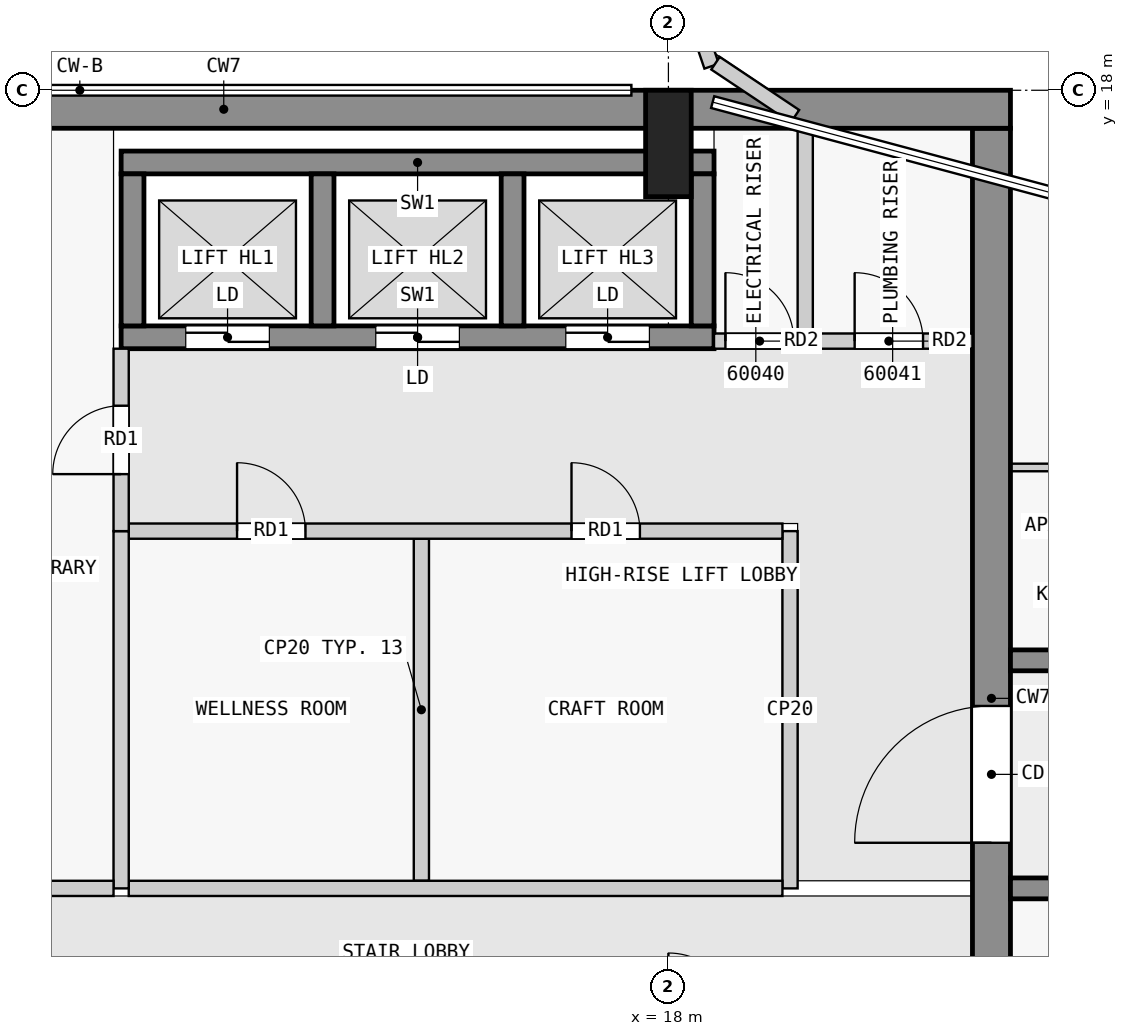
"""IFC4 building model, lengths in metres.
Left out: names, types, materials, properties, quantities, classifications, styles, units other than length and angle.
Written with IfcOpenShell. Run it as: python <this file> out.ifc"""

import sys

from ifc_helpers import new_model, si_unit, direction, frame, frame_2d, origin, origin_2d, place, context, subcontext, project, spatial, rectangle, extrude, element, fill, save


model = new_model("IFC4")
c1 = context("Model", 3, precision=1e-05, world=origin(), true_north=direction((0.0, 1.0)))
c2 = subcontext(c1, "Body", "Model", "MODEL_VIEW")
j1 = project(units=[si_unit("LENGTHUNIT", "METRE"), si_unit("PLANEANGLEUNIT", "RADIAN")], contexts=[c1])
p1 = place(None, origin())
s1 = spatial("IfcSite", under=j1, at=p1, CompositionType="ELEMENT")
p2 = place(p1, origin())
s2 = spatial("IfcBuilding", under=s1, at=p2, CompositionType="ELEMENT")
p3 = place(p2, frame((0.0, 0.0, 229.4)))
s3 = spatial("IfcBuildingStorey", under=s2, at=p3, CompositionType="ELEMENT", Elevation=229.4)
p4 = place(p3, frame((18.0, 17.3, 0.0), z_axis=(0.0, 0.0, 1.0), x_axis=(1.0, 0.0, 0.0)))
e1 = element("IfcColumn", 1, at=p4, inside=s3, PredefinedType="COLUMN", context=c2, shape_type="SweptSolid", body=[
    extrude(rectangle(XDim=0.6, YDim=1.4, at=origin_2d()), origin(), (0.0, 0.0, 1.0), 3.5),
])
p5 = place(p3, frame((1.8, 17.75, 0.0), z_axis=(0.0, 0.0, 1.0), x_axis=(1.0, 0.0, 0.0)))
e2 = element("IfcWall", 2, at=p5, inside=s3, PredefinedType="SHEAR", context=c2, shape_type="SweptSolid", body=[
    extrude(rectangle(XDim=20.7, YDim=0.5, at=frame_2d((10.35, 0.0))), origin(), (0.0, 0.0, 1.0), 3.25),
])
p6 = place(p3, frame((22.25, 2.5, 0.0), z_axis=(0.0, 0.0, 1.0), x_axis=(0.0, 1.0, 0.0)))
e3 = element("IfcWall", 3, at=p6, inside=s3, PredefinedType="SHEAR", context=c2, shape_type="SweptSolid", body=[
    extrude(rectangle(XDim=15.0, YDim=0.5, at=frame_2d((7.5, 0.0))), origin(), (0.0, 0.0, 1.0), 3.25),
])
p7 = place(p6, frame((5.6, 0.0, 0.0)))
e4 = element("IfcOpeningElement", 4, at=p7, cuts=e3, PredefinedType="OPENING", context=c2, shape_type="SweptSolid", body=[
    extrude(rectangle(XDim=1.8, YDim=2.1, at=frame_2d((0.9, 1.05))), frame((0.0, 0.26, 0.0), z_axis=(0.0, -1.0, 0.0), x_axis=(1.0, 0.0, 0.0)), (0.0, 0.0, 1.0), 0.52),
])
p8 = place(p3, frame((10.8, 17.05, 0.0), z_axis=(0.0, 0.0, 1.0), x_axis=(1.0, 0.0, 0.0)))
e5 = element("IfcWall", 5, at=p8, inside=s3, PredefinedType="SHEAR", context=c2, shape_type="SweptSolid", body=[
    extrude(rectangle(XDim=7.8, YDim=0.3, at=frame_2d((3.9, 0.0))), origin(), (0.0, 0.0, 1.0), 3.25),
])
p9 = place(p3, frame((10.8, 14.75, 0.0), z_axis=(0.0, 0.0, 1.0), x_axis=(1.0, 0.0, 0.0)))
e6 = element("IfcWall", 6, at=p9, inside=s3, PredefinedType="SHEAR", context=c2, shape_type="SweptSolid", body=[
    extrude(rectangle(XDim=7.8, YDim=0.3, at=frame_2d((3.9, 0.0))), origin(), (0.0, 0.0, 1.0), 3.25),
])
p10 = place(p9, frame((0.85, 0.0, 0.0)))
e7 = element("IfcOpeningElement", 7, at=p10, cuts=e6, PredefinedType="OPENING", context=c2, shape_type="SweptSolid", body=[
    extrude(rectangle(XDim=1.1, YDim=2.1, at=frame_2d((0.55, 1.05))), frame((0.0, 0.16, 0.0), z_axis=(0.0, -1.0, 0.0), x_axis=(1.0, 0.0, 0.0)), (0.0, 0.0, 1.0), 0.32),
])
p11 = place(p9, frame((3.35, 0.0, 0.0)))
e8 = element("IfcOpeningElement", 8, at=p11, cuts=e6, PredefinedType="OPENING", context=c2, shape_type="SweptSolid", body=[
    extrude(rectangle(XDim=1.1, YDim=2.1, at=frame_2d((0.55, 1.05))), frame((0.0, 0.16, 0.0), z_axis=(0.0, -1.0, 0.0), x_axis=(1.0, 0.0, 0.0)), (0.0, 0.0, 1.0), 0.32),
])
p12 = place(p9, frame((5.85, 0.0, 0.0)))
e9 = element("IfcOpeningElement", 9, at=p12, cuts=e6, PredefinedType="OPENING", context=c2, shape_type="SweptSolid", body=[
    extrude(rectangle(XDim=1.1, YDim=2.1, at=frame_2d((0.55, 1.05))), frame((0.0, 0.16, 0.0), z_axis=(0.0, -1.0, 0.0), x_axis=(1.0, 0.0, 0.0)), (0.0, 0.0, 1.0), 0.32),
])
for number, where, z_axis, x_axis in (
    (10, (10.95, 14.9, 0.0), (0.0, 0.0, 1.0), (0.0, 1.0, 0.0)),
    (11, (13.45, 14.9, 0.0), (0.0, 0.0, 1.0), (0.0, 1.0, 0.0)),
    (12, (15.95, 14.9, 0.0), (0.0, 0.0, 1.0), (0.0, 1.0, 0.0)),
    (13, (18.45, 14.9, 0.0), (0.0, 0.0, 1.0), (0.0, 1.0, 0.0)),
):
    element("IfcWall", number, at=place(p3, frame(where, z_axis=z_axis, x_axis=x_axis)), inside=s3, PredefinedType="SHEAR", context=c2, shape_type="SweptSolid", body=[
        extrude(rectangle(XDim=2.0, YDim=0.3, at=frame_2d((1.0, 0.0))), origin(), (0.0, 0.0, 1.0), 3.25),
    ])
p13 = place(p3, frame((22.5, 7.5, 0.0), z_axis=(0.0, 0.0, 1.0), x_axis=(1.0, 0.0, 0.0)))
e14 = element("IfcWall", 14, at=p13, inside=s3, PredefinedType="SHEAR", context=c2, shape_type="SweptSolid", body=[
    extrude(rectangle(XDim=22.5, YDim=0.275, at=frame_2d((11.25, 0.0))), origin(), (0.0, 0.0, 1.0), 3.25),
])
p14 = place(p13, frame((1.75, 0.0, 0.0)))
e15 = element("IfcOpeningElement", 15, at=p14, cuts=e14, PredefinedType="OPENING", context=c2, shape_type="SweptSolid", body=[
    extrude(rectangle(XDim=1.0, YDim=2.1, at=frame_2d((0.5, 1.05))), frame((0.0, 0.147, 0.0), z_axis=(0.0, -1.0, 0.0), x_axis=(1.0, 0.0, 0.0)), (0.0, 0.0, 1.0), 0.295),
])
p15 = place(p13, frame((5.85, 0.0, 0.0)))
e16 = element("IfcOpeningElement", 16, at=p15, cuts=e14, PredefinedType="OPENING", context=c2, shape_type="SweptSolid", body=[
    extrude(rectangle(XDim=1.8, YDim=2.1, at=frame_2d((0.9, 1.05))), frame((0.0, 0.147, 0.0), z_axis=(0.0, -1.0, 0.0), x_axis=(1.0, 0.0, 0.0)), (0.0, 0.0, 1.0), 0.295),
])
p16 = place(p13, frame((10.75, 0.0, 0.0)))
e17 = element("IfcOpeningElement", 17, at=p16, cuts=e14, PredefinedType="OPENING", context=c2, shape_type="SweptSolid", body=[
    extrude(rectangle(XDim=1.0, YDim=2.1, at=frame_2d((0.5, 1.05))), frame((0.0, 0.147, 0.0), z_axis=(0.0, -1.0, 0.0), x_axis=(1.0, 0.0, 0.0)), (0.0, 0.0, 1.0), 0.295),
])
p17 = place(p13, frame((16.85, 0.0, 0.0)))
e18 = element("IfcOpeningElement", 18, at=p17, cuts=e14, PredefinedType="OPENING", context=c2, shape_type="SweptSolid", body=[
    extrude(rectangle(XDim=1.0, YDim=2.1, at=frame_2d((0.5, 1.05))), frame((0.0, 0.147, 0.0), z_axis=(0.0, -1.0, 0.0), x_axis=(1.0, 0.0, 0.0)), (0.0, 0.0, 1.0), 0.295),
])
p18 = place(p3, frame((22.5, 10.5, 0.0), z_axis=(0.0, 0.0, 1.0), x_axis=(1.0, 0.0, 0.0)))
e19 = element("IfcWall", 19, at=p18, inside=s3, PredefinedType="SHEAR", context=c2, shape_type="SweptSolid", body=[
    extrude(rectangle(XDim=22.5, YDim=0.275, at=frame_2d((11.25, 0.0))), origin(), (0.0, 0.0, 1.0), 3.25),
])
p19 = place(p18, frame((4.05, 0.0, 0.0)))
e20 = element("IfcOpeningElement", 20, at=p19, cuts=e19, PredefinedType="OPENING", context=c2, shape_type="SweptSolid", body=[
    extrude(rectangle(XDim=1.0, YDim=2.1, at=frame_2d((0.5, 1.05))), frame((0.0, 0.147, 0.0), z_axis=(0.0, -1.0, 0.0), x_axis=(1.0, 0.0, 0.0)), (0.0, 0.0, 1.0), 0.295),
])
p20 = place(p18, frame((10.75, 0.0, 0.0)))
e21 = element("IfcOpeningElement", 21, at=p20, cuts=e19, PredefinedType="OPENING", context=c2, shape_type="SweptSolid", body=[
    extrude(rectangle(XDim=1.0, YDim=2.1, at=frame_2d((0.5, 1.05))), frame((0.0, 0.147, 0.0), z_axis=(0.0, -1.0, 0.0), x_axis=(1.0, 0.0, 0.0)), (0.0, 0.0, 1.0), 0.295),
])
p21 = place(p18, frame((15.25, 0.0, 0.0)))
e22 = element("IfcOpeningElement", 22, at=p21, cuts=e19, PredefinedType="OPENING", context=c2, shape_type="SweptSolid", body=[
    extrude(rectangle(XDim=1.0, YDim=2.1, at=frame_2d((0.5, 1.05))), frame((0.0, 0.147, 0.0), z_axis=(0.0, -1.0, 0.0), x_axis=(1.0, 0.0, 0.0)), (0.0, 0.0, 1.0), 0.295),
])
p22 = place(p18, frame((18.75, 0.0, 0.0)))
e23 = element("IfcOpeningElement", 23, at=p22, cuts=e19, PredefinedType="OPENING", context=c2, shape_type="SweptSolid", body=[
    extrude(rectangle(XDim=0.9, YDim=2.1, at=frame_2d((0.45, 1.05))), frame((0.0, 0.147, 0.0), z_axis=(0.0, -1.0, 0.0), x_axis=(1.0, 0.0, 0.0)), (0.0, 0.0, 1.0), 0.295),
])
p23 = place(p18, frame((20.95, 0.0, 0.0)))
e24 = element("IfcOpeningElement", 24, at=p23, cuts=e19, PredefinedType="OPENING", context=c2, shape_type="SweptSolid", body=[
    extrude(rectangle(XDim=1.0, YDim=2.1, at=frame_2d((0.5, 1.05))), frame((0.0, 0.147, 0.0), z_axis=(0.0, -1.0, 0.0), x_axis=(1.0, 0.0, 0.0)), (0.0, 0.0, 1.0), 0.295),
])
p24 = place(p3, frame((17.9, 20.286, 0.0), z_axis=(0.0, 0.0, 1.0), x_axis=(0.321506941149, -0.946907221851, 0.0)))
e25 = element("IfcWall", 25, at=p24, inside=s3, PredefinedType="PARAPET", context=c2, shape_type="SweptSolid", body=[
    extrude(rectangle(XDim=2.079, YDim=0.2, at=frame_2d((1.04, 0.0))), origin(), (0.0, 0.0, 1.0), 1.0),
])
p25 = place(p3, frame((18.619, 18.356, 0.0), z_axis=(0.0, 0.0, 1.0), x_axis=(0.831571950254, -0.555417042907, 0.0)))
e26 = element("IfcWall", 26, at=p25, inside=s3, PredefinedType="PARAPET", context=c2, shape_type="SweptSolid", body=[
    extrude(rectangle(XDim=1.257, YDim=0.2, at=frame_2d((0.628, 0.0))), origin(), (0.0, 0.0, 1.0), 1.0),
])
p26 = place(p3, frame((7.1, 7.5, 0.0), z_axis=(0.0, 0.0, 1.0), x_axis=(1.0, 0.0, 0.0)))
e27 = element("IfcWall", 27, at=p26, inside=s3, PredefinedType="PARTITIONING", context=c2, shape_type="SweptSolid", body=[
    extrude(rectangle(XDim=3.6, YDim=0.2, at=frame_2d((1.8, 0.0))), origin(), (0.0, 0.0, 1.0), 3.25),
])
p27 = place(p3, frame((10.8, 12.2, 0.0), z_axis=(0.0, 0.0, 1.0), x_axis=(0.0, 1.0, 0.0)))
e28 = element("IfcWall", 28, at=p27, inside=s3, PredefinedType="PARTITIONING", context=c2, shape_type="SweptSolid", body=[
    extrude(rectangle(XDim=2.4, YDim=0.2, at=frame_2d((1.2, 0.0))), origin(), (0.0, 0.0, 1.0), 3.25),
])
p28 = place(p27, frame((0.75, 0.0, 0.0)))
e29 = element("IfcOpeningElement", 29, at=p28, cuts=e28, PredefinedType="OPENING", context=c2, shape_type="SweptSolid", body=[
    extrude(rectangle(XDim=0.9, YDim=2.1, at=frame_2d((0.45, 1.05))), frame((0.0, 0.11, 0.0), z_axis=(0.0, -1.0, 0.0), x_axis=(1.0, 0.0, 0.0)), (0.0, 0.0, 1.0), 0.22),
])
p29 = place(p3, frame((10.8, 7.5, 0.0), z_axis=(0.0, 0.0, 1.0), x_axis=(0.0, 1.0, 0.0)))
e30 = element("IfcWall", 30, at=p29, inside=s3, PredefinedType="PARTITIONING", context=c2, shape_type="SweptSolid", body=[
    extrude(rectangle(XDim=4.7, YDim=0.2, at=frame_2d((2.35, 0.0))), origin(), (0.0, 0.0, 1.0), 3.25),
])
p30 = place(p3, frame((10.9, 7.5, 0.0), z_axis=(0.0, 0.0, 1.0), x_axis=(1.0, 0.0, 0.0)))
e31 = element("IfcWall", 31, at=p30, inside=s3, PredefinedType="PARTITIONING", context=c2, shape_type="SweptSolid", body=[
    extrude(rectangle(XDim=8.6, YDim=0.2, at=frame_2d((4.3, 0.0))), origin(), (0.0, 0.0, 1.0), 3.25),
])
p31 = place(p3, frame((19.6, 7.5, 0.0), z_axis=(0.0, 0.0, 1.0), x_axis=(0.0, 1.0, 0.0)))
e32 = element("IfcWall", 32, at=p31, inside=s3, PredefinedType="PARTITIONING", context=c2, shape_type="SweptSolid", body=[
    extrude(rectangle(XDim=4.7, YDim=0.2, at=frame_2d((2.35, 0.0))), origin(), (0.0, 0.0, 1.0), 3.25),
])
p32 = place(p3, frame((10.9, 12.2, 0.0), z_axis=(0.0, 0.0, 1.0), x_axis=(1.0, 0.0, 0.0)))
e33 = element("IfcWall", 33, at=p32, inside=s3, PredefinedType="PARTITIONING", context=c2, shape_type="SweptSolid", body=[
    extrude(rectangle(XDim=8.6, YDim=0.2, at=frame_2d((4.3, 0.0))), origin(), (0.0, 0.0, 1.0), 3.25),
])
p33 = place(p32, frame((1.425, 0.0, 0.0)))
e34 = element("IfcOpeningElement", 34, at=p33, cuts=e33, PredefinedType="OPENING", context=c2, shape_type="SweptSolid", body=[
    extrude(rectangle(XDim=0.9, YDim=2.1, at=frame_2d((0.45, 1.05))), frame((0.0, 0.11, 0.0), z_axis=(0.0, -1.0, 0.0), x_axis=(1.0, 0.0, 0.0)), (0.0, 0.0, 1.0), 0.22),
])
p34 = place(p32, frame((5.825, 0.0, 0.0)))
e35 = element("IfcOpeningElement", 35, at=p34, cuts=e33, PredefinedType="OPENING", context=c2, shape_type="SweptSolid", body=[
    extrude(rectangle(XDim=0.9, YDim=2.1, at=frame_2d((0.45, 1.05))), frame((0.0, 0.11, 0.0), z_axis=(0.0, -1.0, 0.0), x_axis=(1.0, 0.0, 0.0)), (0.0, 0.0, 1.0), 0.22),
])
p35 = place(p3, frame((14.75, 7.6, 0.0), z_axis=(0.0, 0.0, 1.0), x_axis=(0.0, 1.0, 0.0)))
e36 = element("IfcWall", 36, at=p35, inside=s3, PredefinedType="PARTITIONING", context=c2, shape_type="SweptSolid", body=[
    extrude(rectangle(XDim=4.5, YDim=0.2, at=frame_2d((2.25, 0.0))), origin(), (0.0, 0.0, 1.0), 3.25),
])
p36 = place(p3, frame((18.6, 14.7, 0.0), z_axis=(0.0, 0.0, 1.0), x_axis=(1.0, 0.0, 0.0)))
e37 = element("IfcWall", 37, at=p36, inside=s3, PredefinedType="PARTITIONING", context=c2, shape_type="SweptSolid", body=[
    extrude(rectangle(XDim=3.4, YDim=0.2, at=frame_2d((1.7, 0.0))), origin(), (0.0, 0.0, 1.0), 3.25),
])
p37 = place(p36, frame((0.15, 0.0, 0.0)))
e38 = element("IfcOpeningElement", 38, at=p37, cuts=e37, PredefinedType="OPENING", context=c2, shape_type="SweptSolid", body=[
    extrude(rectangle(XDim=0.9, YDim=2.1, at=frame_2d((0.45, 1.05))), frame((0.0, 0.11, 0.0), z_axis=(0.0, -1.0, 0.0), x_axis=(1.0, 0.0, 0.0)), (0.0, 0.0, 1.0), 0.22),
])
p38 = place(p36, frame((1.85, 0.0, 0.0)))
e39 = element("IfcOpeningElement", 39, at=p38, cuts=e37, PredefinedType="OPENING", context=c2, shape_type="SweptSolid", body=[
    extrude(rectangle(XDim=0.9, YDim=2.1, at=frame_2d((0.45, 1.05))), frame((0.0, 0.11, 0.0), z_axis=(0.0, -1.0, 0.0), x_axis=(1.0, 0.0, 0.0)), (0.0, 0.0, 1.0), 0.22),
])
p39 = place(p3, frame((19.8, 14.8, 0.0), z_axis=(0.0, 0.0, 1.0), x_axis=(0.0, 1.0, 0.0)))
e40 = element("IfcWall", 40, at=p39, inside=s3, PredefinedType="PARTITIONING", context=c2, shape_type="SweptSolid", body=[
    extrude(rectangle(XDim=2.7, YDim=0.2, at=frame_2d((1.35, 0.0))), origin(), (0.0, 0.0, 1.0), 3.25),
])
p40 = place(p3, frame((24.25, 13.038, 0.0), z_axis=(0.0, 0.0, 1.0), x_axis=(-1.0, 0.0, 0.0)))
e41 = element("IfcWall", 41, at=p40, inside=s3, PredefinedType="PARTITIONING", context=c2, shape_type="SweptSolid", body=[
    extrude(rectangle(XDim=1.75, YDim=0.1, at=frame_2d((0.875, 0.0))), origin(), (0.0, 0.0, 1.0), 3.25),
])
p41 = place(p28, origin())
e42 = element("IfcDoor", 42, at=p41, inside=s3, OperationType="SINGLE_SWING_LEFT", PredefinedType="DOOR", context=c2, shape_type="SweptSolid", body=[
    extrude(rectangle(XDim=0.9, YDim=2.1, at=frame_2d((0.45, 1.05))), frame((0.0, 0.025, 0.0), z_axis=(0.0, -1.0, 0.0), x_axis=(1.0, 0.0, 0.0)), (0.0, 0.0, 1.0), 0.05),
])
fill(e29, e42)
p42 = place(p33, origin())
e43 = element("IfcDoor", 43, at=p42, inside=s3, OperationType="SINGLE_SWING_LEFT", PredefinedType="DOOR", context=c2, shape_type="SweptSolid", body=[
    extrude(rectangle(XDim=0.9, YDim=2.1, at=frame_2d((0.45, 1.05))), frame((0.0, 0.025, 0.0), z_axis=(0.0, -1.0, 0.0), x_axis=(1.0, 0.0, 0.0)), (0.0, 0.0, 1.0), 0.05),
])
fill(e34, e43)
p43 = place(p34, origin())
e44 = element("IfcDoor", 44, at=p43, inside=s3, OperationType="SINGLE_SWING_LEFT", PredefinedType="DOOR", context=c2, shape_type="SweptSolid", body=[
    extrude(rectangle(XDim=0.9, YDim=2.1, at=frame_2d((0.45, 1.05))), frame((0.0, 0.025, 0.0), z_axis=(0.0, -1.0, 0.0), x_axis=(1.0, 0.0, 0.0)), (0.0, 0.0, 1.0), 0.05),
])
fill(e35, e44)
p44 = place(p10, origin())
e45 = element("IfcDoor", 45, at=p44, inside=s3, OperationType="DOUBLE_DOOR_SLIDING", PredefinedType="DOOR", context=c2, shape_type="SweptSolid", body=[
    extrude(rectangle(XDim=1.1, YDim=2.1, at=frame_2d((0.55, 1.05))), frame((0.0, 0.025, 0.0), z_axis=(0.0, -1.0, 0.0), x_axis=(1.0, 0.0, 0.0)), (0.0, 0.0, 1.0), 0.05),
])
fill(e7, e45)
p45 = place(p11, origin())
e46 = element("IfcDoor", 46, at=p45, inside=s3, OperationType="DOUBLE_DOOR_SLIDING", PredefinedType="DOOR", context=c2, shape_type="SweptSolid", body=[
    extrude(rectangle(XDim=1.1, YDim=2.1, at=frame_2d((0.55, 1.05))), frame((0.0, 0.025, 0.0), z_axis=(0.0, -1.0, 0.0), x_axis=(1.0, 0.0, 0.0)), (0.0, 0.0, 1.0), 0.05),
])
fill(e8, e46)
p46 = place(p12, origin())
e47 = element("IfcDoor", 47, at=p46, inside=s3, OperationType="DOUBLE_DOOR_SLIDING", PredefinedType="DOOR", context=c2, shape_type="SweptSolid", body=[
    extrude(rectangle(XDim=1.1, YDim=2.1, at=frame_2d((0.55, 1.05))), frame((0.0, 0.025, 0.0), z_axis=(0.0, -1.0, 0.0), x_axis=(1.0, 0.0, 0.0)), (0.0, 0.0, 1.0), 0.05),
])
fill(e9, e47)
p47 = place(p7, origin())
e48 = element("IfcDoor", 48, at=p47, inside=s3, OperationType="DOUBLE_DOOR_SINGLE_SWING", PredefinedType="DOOR", context=c2, shape_type="SweptSolid", body=[
    extrude(rectangle(XDim=1.8, YDim=2.1, at=frame_2d((0.9, 1.05))), frame((0.0, 0.025, 0.0), z_axis=(0.0, -1.0, 0.0), x_axis=(1.0, 0.0, 0.0)), (0.0, 0.0, 1.0), 0.05),
])
fill(e4, e48)
p48 = place(p37, origin())
e49 = element("IfcDoor", 49, at=p48, inside=s3, OperationType="SINGLE_SWING_LEFT", PredefinedType="DOOR", context=c2, shape_type="SweptSolid", body=[
    extrude(rectangle(XDim=0.9, YDim=2.1, at=frame_2d((0.45, 1.05))), frame((0.0, 0.025, 0.0), z_axis=(0.0, -1.0, 0.0), x_axis=(1.0, 0.0, 0.0)), (0.0, 0.0, 1.0), 0.05),
])
fill(e38, e49)
p49 = place(p38, origin())
e50 = element("IfcDoor", 50, at=p49, inside=s3, OperationType="SINGLE_SWING_LEFT", PredefinedType="DOOR", context=c2, shape_type="SweptSolid", body=[
    extrude(rectangle(XDim=0.9, YDim=2.1, at=frame_2d((0.45, 1.05))), frame((0.0, 0.025, 0.0), z_axis=(0.0, -1.0, 0.0), x_axis=(1.0, 0.0, 0.0)), (0.0, 0.0, 1.0), 0.05),
])
fill(e39, e50)
save(model, sys.argv[1])
